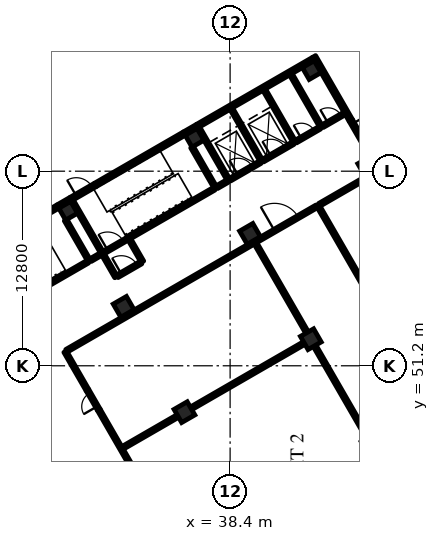
"""IFC4 building model, lengths in metres.
Left out: names, types, materials, properties, quantities, classifications, styles, units other than length and angle.
Written with IfcOpenShell. Run it as: python <this file> out.ifc"""

import sys

from ifc_helpers import new_model, si_unit, direction, frame, frame_2d, origin, origin_2d, place, context, subcontext, project, spatial, rectangle, extrude, element, fill, save


model = new_model("IFC4")
c1 = context("Model", 3, precision=1e-05, world=origin(), true_north=direction((0.0, 1.0)))
c2 = subcontext(c1, "Body", "Model", "MODEL_VIEW")
j1 = project(units=[si_unit("LENGTHUNIT", "METRE"), si_unit("PLANEANGLEUNIT", "RADIAN")], contexts=[c1])
p1 = place(None, origin())
s1 = spatial("IfcSite", under=j1, at=p1, CompositionType="ELEMENT")
p2 = place(p1, origin())
s2 = spatial("IfcBuilding", under=s1, at=p2, CompositionType="ELEMENT")
p3 = place(p2, origin())
s3 = spatial("IfcBuildingStorey", under=s2, at=p3, CompositionType="ELEMENT", Elevation=0.0)
for number, where, z_axis, x_axis in (
    (1, (35.396, 48.149, -0.3), (0.0, 0.0, 1.0), (-0.5, 0.866, 0.0)),
    (2, (43.71, 52.948, -0.3), (0.0, 0.0, 1.0), (-0.5, 0.866, 0.0)),
    (3, (31.396, 55.077, -0.3), (0.0, 0.0, 1.0), (-0.5, 0.866, 0.0)),
    (4, (39.71, 59.877, -0.3), (0.0, 0.0, 1.0), (-0.5, 0.866, 0.0)),
):
    element("IfcColumn", number, at=place(p3, frame(where, z_axis=z_axis, x_axis=x_axis)), inside=s3, PredefinedType="COLUMN", context=c2, shape_type="SweptSolid", body=[
        extrude(rectangle(XDim=1.0, YDim=1.0, at=origin_2d()), origin(), (0.0, 0.0, 1.0), 6.3),
    ])
for number, where, z_axis, x_axis in (
    (5, (47.417, 64.327, -0.3), (0.0, 0.0, 1.0), (-0.5, 0.866, 0.0)),
    (6, (27.746, 61.399, -0.3), (0.0, 0.0, 1.0), (-0.5, 0.866, 0.0)),
    (7, (36.06, 66.199, -0.3), (0.0, 0.0, 1.0), (-0.5, 0.866, 0.0)),
    (8, (43.767, 70.649, -0.3), (0.0, 0.0, 1.0), (-0.5, 0.866, 0.0)),
):
    element("IfcColumn", number, at=place(p3, frame(where, z_axis=z_axis, x_axis=x_axis)), inside=s3, PredefinedType="COLUMN", context=c2, shape_type="SweptSolid", body=[
        extrude(rectangle(XDim=0.9, YDim=0.9, at=origin_2d()), origin(), (0.0, 0.0, 1.0), 6.3),
    ])
p4 = place(p3, frame((38.194, 63.303, -1.5), z_axis=(0.0, 0.0, 1.0), x_axis=(0.866009148195, 0.50002815445, 0.0)))
e9 = element("IfcWall", 9, at=p4, inside=s3, PredefinedType="SOLIDWALL", context=c2, shape_type="SweptSolid", body=[
    extrude(rectangle(XDim=5.3, YDim=0.25, at=frame_2d((2.65, 0.0))), origin(), (0.0, 0.0, 1.0), 1.2),
])
p5 = place(p3, frame((36.719, 65.857, -1.5), z_axis=(0.0, 0.0, 1.0), x_axis=(0.866020664882, 0.50000820793, 0.0)))
e10 = element("IfcWall", 10, at=p5, inside=s3, PredefinedType="SOLIDWALL", context=c2, shape_type="SweptSolid", body=[
    extrude(rectangle(XDim=5.3, YDim=0.25, at=frame_2d((2.65, 0.0))), origin(), (0.0, 0.0, 1.0), 1.2),
])
p6 = place(p3, frame((38.239, 63.473, -1.5), z_axis=(0.0, 0.0, 1.0), x_axis=(-0.4999416173, 0.866059108428, 0.0)))
e11 = element("IfcWall", 11, at=p6, inside=s3, PredefinedType="SOLIDWALL", context=c2, shape_type="SweptSolid", body=[
    extrude(rectangle(XDim=2.7, YDim=0.25, at=frame_2d((1.35, 0.0))), origin(), (0.0, 0.0, 1.0), 1.2),
])
p7 = place(p3, frame((42.613, 65.999, -1.5), z_axis=(0.0, 0.0, 1.0), x_axis=(-0.50000943426, 0.866019956843, 0.0)))
e12 = element("IfcWall", 12, at=p7, inside=s3, PredefinedType="SOLIDWALL", context=c2, shape_type="SweptSolid", body=[
    extrude(rectangle(XDim=2.7, YDim=0.25, at=frame_2d((1.35, 0.0))), origin(), (0.0, 0.0, 1.0), 1.2),
])
p8 = place(p3, frame((46.34, 67.342, 0.0), z_axis=(0.0, 0.0, 1.0), x_axis=(0.499998129301, -0.86602648383, 0.0)))
e13 = element("IfcWall", 13, at=p8, inside=s3, PredefinedType="SOLIDWALL", context=c2, shape_type="SweptSolid", body=[
    extrude(rectangle(XDim=2.3, YDim=0.25, at=frame_2d((1.15, 0.0))), origin(), (0.0, 0.0, 1.0), 5.7),
])
p9 = place(p8, frame((0.25, 0.0, 0.0)))
e14 = element("IfcOpeningElement", 14, at=p9, cuts=e13, PredefinedType="OPENING", context=c2, shape_type="SweptSolid", body=[
    extrude(rectangle(XDim=1.8, YDim=2.1, at=frame_2d((0.9, 1.05))), frame((0.0, 0.135, 0.0), z_axis=(0.0, -1.0, 0.0), x_axis=(1.0, 0.0, 0.0)), (0.0, 0.0, 1.0), 0.27),
])
p10 = place(p3, frame((43.915, 71.542, 0.0), z_axis=(0.0, 0.0, 1.0), x_axis=(0.500010041276, -0.866019606374, 0.0)))
e15 = element("IfcWall", 15, at=p10, inside=s3, PredefinedType="SOLIDWALL", context=c2, shape_type="SweptSolid", body=[
    extrude(rectangle(XDim=4.85, YDim=0.25, at=frame_2d((2.425, 0.0))), origin(), (0.0, 0.0, 1.0), 5.7),
])
p11 = place(p3, frame((21.223, 58.297, 0.0), z_axis=(0.0, 0.0, 1.0), x_axis=(0.866026575979, 0.499997969693, 0.0)))
e16 = element("IfcWall", 16, at=p11, inside=s3, PredefinedType="SOLIDWALL", context=c2, shape_type="SweptSolid", body=[
    extrude(rectangle(XDim=6.75, YDim=0.25, at=frame_2d((3.375, 0.0))), origin(), (0.0, 0.0, 1.0), 5.7),
])
p12 = place(p3, frame((27.935, 62.172, 0.0), z_axis=(0.0, 0.0, 1.0), x_axis=(0.866091100096, 0.499886193382, 0.0)))
e17 = element("IfcWall", 17, at=p12, inside=s3, PredefinedType="SOLIDWALL", context=c2, shape_type="SweptSolid", body=[
    extrude(rectangle(XDim=1.85, YDim=0.25, at=frame_2d((0.925, 0.0))), origin(), (0.0, 0.0, 1.0), 5.7),
])
p13 = place(p12, frame((0.4, 0.0, 0.0)))
e18 = element("IfcOpeningElement", 18, at=p13, cuts=e17, PredefinedType="OPENING", context=c2, shape_type="SweptSolid", body=[
    extrude(rectangle(XDim=1.2, YDim=2.1, at=frame_2d((0.6, 1.05))), frame((0.0, 0.135, 0.0), z_axis=(0.0, -1.0, 0.0), x_axis=(1.0, 0.0, 0.0)), (0.0, 0.0, 1.0), 0.27),
])
p14 = place(p3, frame((29.537, 63.097, 0.0), z_axis=(0.0, 0.0, 1.0), x_axis=(0.866026575979, 0.499997969693, 0.0)))
e19 = element("IfcWall", 19, at=p14, inside=s3, PredefinedType="SOLIDWALL", context=c2, shape_type="SweptSolid", body=[
    extrude(rectangle(XDim=6.75, YDim=0.25, at=frame_2d((3.375, 0.0))), origin(), (0.0, 0.0, 1.0), 5.7),
])
p15 = place(p3, frame((36.249, 66.972, 0.0), z_axis=(0.0, 0.0, 1.0), x_axis=(0.866013253925, 0.500021043584, 0.0)))
e20 = element("IfcWall", 20, at=p15, inside=s3, PredefinedType="SOLIDWALL", context=c2, shape_type="SweptSolid", body=[
    extrude(rectangle(XDim=8.8, YDim=0.25, at=frame_2d((4.4, 0.0))), origin(), (0.0, 0.0, 1.0), 5.7),
])
for number, where, z_axis, x_axis in (
    (21, (27.069, 61.672, 0.0), (0.0, 0.0, 1.0), (0.866, 0.5, 0.0)),
    (22, (35.383, 66.472, 0.0), (0.0, 0.0, 1.0), (0.866, 0.5, 0.0)),
):
    element("IfcWall", number, at=place(p3, frame(where, z_axis=z_axis, x_axis=x_axis)), inside=s3, PredefinedType="SOLIDWALL", context=c2, shape_type="SweptSolid", body=[
        extrude(rectangle(XDim=1.0, YDim=0.25, at=frame_2d((0.5, 0.0))), origin(), (0.0, 0.0, 1.0), 5.7),
    ])
p16 = place(p3, frame((29.131, 58.099, 0.0), z_axis=(0.0, 0.0, 1.0), x_axis=(-0.49999285859, 0.86602952684, 0.0)))
e23 = element("IfcWall", 23, at=p16, inside=s3, PredefinedType="SOLIDWALL", context=c2, shape_type="SweptSolid", body=[
    extrude(rectangle(XDim=3.1, YDim=0.2, at=frame_2d((1.55, 0.0))), origin(), (0.0, 0.0, 1.0), 5.7),
])
p17 = place(p3, frame((29.997, 58.599, 0.0), z_axis=(0.0, 0.0, 1.0), x_axis=(-0.49999894854, 0.866026010844, 0.0)))
e24 = element("IfcWall", 24, at=p17, inside=s3, PredefinedType="SOLIDWALL", context=c2, shape_type="SweptSolid", body=[
    extrude(rectangle(XDim=4.0, YDim=0.2, at=frame_2d((2.0, 0.0))), origin(), (0.0, 0.0, 1.0), 5.7),
])
p18 = place(p3, frame((37.445, 62.899, 0.0), z_axis=(0.0, 0.0, 1.0), x_axis=(-0.500026960575, 0.86600983753, 0.0)))
e25 = element("IfcWall", 25, at=p18, inside=s3, PredefinedType="SOLIDWALL", context=c2, shape_type="SweptSolid", body=[
    extrude(rectangle(XDim=3.1, YDim=0.2, at=frame_2d((1.55, 0.0))), origin(), (0.0, 0.0, 1.0), 5.7),
])
p19 = place(p3, frame((23.285, 54.724, 0.0), z_axis=(0.0, 0.0, 1.0), x_axis=(0.866027239912, 0.49999681972, 0.0)))
e26 = element("IfcWall", 26, at=p19, inside=s3, PredefinedType="SOLIDWALL", context=c2, shape_type="SweptSolid", body=[
    extrude(rectangle(XDim=6.65, YDim=0.2, at=frame_2d((3.325, 0.0))), origin(), (0.0, 0.0, 1.0), 5.7),
])
p20 = place(p3, frame((30.084, 58.649, 0.0), z_axis=(0.0, 0.0, 1.0), x_axis=(0.866036909293, 0.499980071345, 0.0)))
e27 = element("IfcWall", 27, at=p20, inside=s3, PredefinedType="SOLIDWALL", context=c2, shape_type="SweptSolid", body=[
    extrude(rectangle(XDim=1.75, YDim=0.2, at=frame_2d((0.875, 0.0))), origin(), (0.0, 0.0, 1.0), 5.7),
])
p21 = place(p20, frame((0.3, 0.0, 0.0)))
e28 = element("IfcOpeningElement", 28, at=p21, cuts=e27, PredefinedType="OPENING", context=c2, shape_type="SweptSolid", body=[
    extrude(rectangle(XDim=1.2, YDim=2.1, at=frame_2d((0.6, 1.05))), frame((0.0, 0.11, 0.0), z_axis=(0.0, -1.0, 0.0), x_axis=(1.0, 0.0, 0.0)), (0.0, 0.0, 1.0), 0.22),
])
p22 = place(p3, frame((31.599, 59.524, 0.0), z_axis=(0.0, 0.0, 1.0), x_axis=(0.866027239912, 0.49999681972, 0.0)))
e29 = element("IfcWall", 29, at=p22, inside=s3, PredefinedType="SOLIDWALL", context=c2, shape_type="SweptSolid", body=[
    extrude(rectangle(XDim=6.65, YDim=0.2, at=frame_2d((3.325, 0.0))), origin(), (0.0, 0.0, 1.0), 5.7),
])
for number, where, z_axis, x_axis in (
    (30, (38.311, 63.399, 0.0), (0.0, 0.0, 1.0), (-0.5, 0.866, 0.0)),
    (31, (40.476, 64.649, 0.0), (0.0, 0.0, 1.0), (-0.5, 0.866, 0.0)),
    (32, (42.641, 65.899, 0.0), (0.0, 0.0, 1.0), (-0.5, 0.866, 0.0)),
):
    element("IfcWall", number, at=place(p3, frame(where, z_axis=z_axis, x_axis=x_axis)), inside=s3, PredefinedType="SOLIDWALL", context=c2, shape_type="SweptSolid", body=[
        extrude(rectangle(XDim=4.0, YDim=0.2, at=frame_2d((2.0, 0.0))), origin(), (0.0, 0.0, 1.0), 5.7),
    ])
p23 = place(p3, frame((38.398, 63.449, 0.0), z_axis=(0.0, 0.0, 1.0), x_axis=(0.86602648383, 0.499998129301, 0.0)))
e33 = element("IfcWall", 33, at=p23, inside=s3, PredefinedType="SOLIDWALL", context=c2, shape_type="SweptSolid", body=[
    extrude(rectangle(XDim=2.3, YDim=0.2, at=frame_2d((1.15, 0.0))), origin(), (0.0, 0.0, 1.0), 5.7),
])
p24 = place(p23, frame((0.6, 0.0, 0.0)))
e34 = element("IfcOpeningElement", 34, at=p24, cuts=e33, PredefinedType="OPENING", context=c2, shape_type="SweptSolid", body=[
    extrude(rectangle(XDim=1.1, YDim=2.1, at=frame_2d((0.55, 1.05))), frame((0.0, 0.11, 0.0), z_axis=(0.0, -1.0, 0.0), x_axis=(1.0, 0.0, 0.0)), (0.0, 0.0, 1.0), 0.22),
])
p25 = place(p3, frame((40.563, 64.699, 0.0), z_axis=(0.0, 0.0, 1.0), x_axis=(0.86602648383, 0.499998129301, 0.0)))
e35 = element("IfcWall", 35, at=p25, inside=s3, PredefinedType="SOLIDWALL", context=c2, shape_type="SweptSolid", body=[
    extrude(rectangle(XDim=2.3, YDim=0.2, at=frame_2d((1.15, 0.0))), origin(), (0.0, 0.0, 1.0), 5.7),
])
p26 = place(p25, frame((0.6, 0.0, 0.0)))
e36 = element("IfcOpeningElement", 36, at=p26, cuts=e35, PredefinedType="OPENING", context=c2, shape_type="SweptSolid", body=[
    extrude(rectangle(XDim=1.1, YDim=2.1, at=frame_2d((0.55, 1.05))), frame((0.0, 0.11, 0.0), z_axis=(0.0, -1.0, 0.0), x_axis=(1.0, 0.0, 0.0)), (0.0, 0.0, 1.0), 0.22),
])
for number, where, z_axis, x_axis in (
    (37, (30.897, 57.041, 0.0), (0.0, 0.0, 1.0), (-0.5, 0.866, 0.0)),
    (38, (32.629, 58.041, 0.0), (0.0, 0.0, 1.0), (-0.5, 0.866, 0.0)),
):
    element("IfcWall", number, at=place(p3, frame(where, z_axis=z_axis, x_axis=x_axis)), inside=s3, PredefinedType="PARTITIONING", context=c2, shape_type="SweptSolid", body=[
        extrude(rectangle(XDim=1.7, YDim=0.2, at=frame_2d((0.85, 0.0))), origin(), (0.0, 0.0, 1.0), 5.1),
    ])
p27 = place(p3, frame((30.984, 57.091, 0.0), z_axis=(0.0, 0.0, 1.0), x_axis=(0.866047807691, 0.499961193289, 0.0)))
e39 = element("IfcWall", 39, at=p27, inside=s3, PredefinedType="PARTITIONING", context=c2, shape_type="SweptSolid", body=[
    extrude(rectangle(XDim=1.8, YDim=0.2, at=frame_2d((0.9, 0.0))), origin(), (0.0, 0.0, 1.0), 5.1),
])
p28 = place(p27, frame((0.3, 0.0, 0.0)))
e40 = element("IfcOpeningElement", 40, at=p28, cuts=e39, PredefinedType="OPENING", context=c2, shape_type="SweptSolid", body=[
    extrude(rectangle(XDim=1.2, YDim=2.1, at=frame_2d((0.6, 1.05))), frame((0.0, 0.11, 0.0), z_axis=(0.0, -1.0, 0.0), x_axis=(1.0, 0.0, 0.0)), (0.0, 0.0, 1.0), 0.22),
])
p29 = place(p3, frame((44.395, 66.912, 0.0), z_axis=(0.0, 0.0, 1.0), x_axis=(-0.49999894854, 0.866026010844, 0.0)))
e41 = element("IfcWall", 41, at=p29, inside=s3, PredefinedType="PARTITIONING", context=c2, shape_type="SweptSolid", body=[
    extrude(rectangle(XDim=4.0, YDim=0.2, at=frame_2d((2.0, 0.0))), origin(), (0.0, 0.0, 1.0), 5.1),
])
p30 = place(p3, frame((42.728, 65.949, 0.0), z_axis=(0.0, 0.0, 1.0), x_axis=(0.866036312054, 0.499981105847, 0.0)))
e42 = element("IfcWall", 42, at=p30, inside=s3, PredefinedType="PARTITIONING", context=c2, shape_type="SweptSolid", body=[
    extrude(rectangle(XDim=1.825, YDim=0.2, at=frame_2d((0.912, 0.0))), origin(), (0.0, 0.0, 1.0), 5.1),
])
p31 = place(p30, frame((0.413, 0.0, 0.0)))
e43 = element("IfcOpeningElement", 43, at=p31, cuts=e42, PredefinedType="OPENING", context=c2, shape_type="SweptSolid", body=[
    extrude(rectangle(XDim=1.0, YDim=2.1, at=frame_2d((0.5, 1.05))), frame((0.0, 0.11, 0.0), z_axis=(0.0, -1.0, 0.0), x_axis=(1.0, 0.0, 0.0)), (0.0, 0.0, 1.0), 0.22),
])
p32 = place(p3, frame((44.481, 66.962, 0.0), z_axis=(0.0, 0.0, 1.0), x_axis=(0.866027799164, 0.499995851058, 0.0)))
e44 = element("IfcWall", 44, at=p32, inside=s3, PredefinedType="PARTITIONING", context=c2, shape_type="SweptSolid", body=[
    extrude(rectangle(XDim=1.675, YDim=0.2, at=frame_2d((0.837, 0.0))), origin(), (0.0, 0.0, 1.0), 5.1),
])
p33 = place(p32, frame((0.413, 0.0, 0.0)))
e45 = element("IfcOpeningElement", 45, at=p33, cuts=e44, PredefinedType="OPENING", context=c2, shape_type="SweptSolid", body=[
    extrude(rectangle(XDim=1.0, YDim=2.1, at=frame_2d((0.5, 1.05))), frame((0.0, 0.11, 0.0), z_axis=(0.0, -1.0, 0.0), x_axis=(1.0, 0.0, 0.0)), (0.0, 0.0, 1.0), 0.22),
])
p34 = place(p3, frame((26.832, 43.781, 0.0), z_axis=(0.0, 0.0, 1.0), x_axis=(-0.499988857673, 0.866031836714, 0.0)))
e46 = element("IfcWall", 46, at=p34, inside=s3, PredefinedType="PARTITIONING", context=c2, shape_type="SweptSolid", body=[
    extrude(rectangle(XDim=6.875, YDim=0.2, at=frame_2d((3.438, 0.0))), origin(), (0.0, 0.0, 1.0), 5.1),
])
p35 = place(p3, frame((34.664, 39.816, 0.0), z_axis=(0.0, 0.0, 1.0), x_axis=(-0.49999201416, 0.866030014362, 0.0)))
e47 = element("IfcWall", 47, at=p35, inside=s3, PredefinedType="PARTITIONING", context=c2, shape_type="SweptSolid", body=[
    extrude(rectangle(XDim=9.8, YDim=0.2, at=frame_2d((4.9, 0.0))), origin(), (0.0, 0.0, 1.0), 5.1),
])
p36 = place(p3, frame((29.764, 48.303, 0.0), z_axis=(0.0, 0.0, 1.0), x_axis=(-0.500060622324, 0.86599040064, 0.0)))
e48 = element("IfcWall", 48, at=p36, inside=s3, PredefinedType="PARTITIONING", context=c2, shape_type="SweptSolid", body=[
    extrude(rectangle(XDim=1.5, YDim=0.2, at=frame_2d((0.75, 0.0))), origin(), (0.0, 0.0, 1.0), 5.1),
])
p37 = place(p36, frame((0.25, 0.0, 0.0)))
e49 = element("IfcOpeningElement", 49, at=p37, cuts=e48, PredefinedType="OPENING", context=c2, shape_type="SweptSolid", body=[
    extrude(rectangle(XDim=1.0, YDim=2.1, at=frame_2d((0.5, 1.05))), frame((0.0, 0.11, 0.0), z_axis=(0.0, -1.0, 0.0), x_axis=(1.0, 0.0, 0.0)), (0.0, 0.0, 1.0), 0.22),
])
p38 = place(p3, frame((29.014, 49.602, 0.0), z_axis=(0.0, 0.0, 1.0), x_axis=(-0.499963291492, 0.866046596414, 0.0)))
e50 = element("IfcWall", 50, at=p38, inside=s3, PredefinedType="PARTITIONING", context=c2, shape_type="SweptSolid", body=[
    extrude(rectangle(XDim=2.925, YDim=0.2, at=frame_2d((1.462, 0.0))), origin(), (0.0, 0.0, 1.0), 5.1),
])
p39 = place(p3, frame((47.46, 46.453, 0.0), z_axis=(0.0, 0.0, 1.0), x_axis=(-0.499995173006, 0.866028190633, 0.0)))
e51 = element("IfcWall", 51, at=p39, inside=s3, PredefinedType="PARTITIONING", context=c2, shape_type="SweptSolid", body=[
    extrude(rectangle(XDim=7.0, YDim=0.2, at=frame_2d((3.5, 0.0))), origin(), (0.0, 0.0, 1.0), 5.1),
])
p40 = place(p3, frame((43.46, 53.382, 0.0), z_axis=(0.0, 0.0, 1.0), x_axis=(-0.499988857673, 0.866031836714, 0.0)))
e52 = element("IfcWall", 52, at=p40, inside=s3, PredefinedType="PARTITIONING", context=c2, shape_type="SweptSolid", body=[
    extrude(rectangle(XDim=6.875, YDim=0.2, at=frame_2d((3.438, 0.0))), origin(), (0.0, 0.0, 1.0), 5.1),
])
p41 = place(p3, frame((47.442, 56.085, 0.0), z_axis=(0.0, 0.0, 1.0), x_axis=(-0.499990197047, 0.866031063448, 0.0)))
e53 = element("IfcWall", 53, at=p41, inside=s3, PredefinedType="PARTITIONING", context=c2, shape_type="SweptSolid", body=[
    extrude(rectangle(XDim=6.525, YDim=0.2, at=frame_2d((3.263, 0.0))), origin(), (0.0, 0.0, 1.0), 5.1),
])
p42 = place(p3, frame((31.325, 45.799, 0.0), z_axis=(0.0, 0.0, 1.0), x_axis=(0.866023935413, 0.500002543286, 0.0)))
e54 = element("IfcWall", 54, at=p42, inside=s3, PredefinedType="PARTITIONING", context=c2, shape_type="SweptSolid", body=[
    extrude(rectangle(XDim=4.2, YDim=0.2, at=frame_2d((2.1, 0.0))), origin(), (0.0, 0.0, 1.0), 5.1),
])
p43 = place(p3, frame((35.829, 48.399, 0.0), z_axis=(0.0, 0.0, 1.0), x_axis=(0.866033360935, 0.499986217557, 0.0)))
e55 = element("IfcWall", 55, at=p43, inside=s3, PredefinedType="PARTITIONING", context=c2, shape_type="SweptSolid", body=[
    extrude(rectangle(XDim=8.6, YDim=0.2, at=frame_2d((4.3, 0.0))), origin(), (0.0, 0.0, 1.0), 5.1),
])
p44 = place(p3, frame((27.638, 52.186, 0.0), z_axis=(0.0, 0.0, 1.0), x_axis=(0.866023247849, 0.500003734171, 0.0)))
e56 = element("IfcWall", 56, at=p44, inside=s3, PredefinedType="PARTITIONING", context=c2, shape_type="SweptSolid", body=[
    extrude(rectangle(XDim=14.2, YDim=0.2, at=frame_2d((7.1, 0.0))), origin(), (0.0, 0.0, 1.0), 5.1),
])
p45 = place(p3, frame((44.266, 61.786, 0.0), z_axis=(0.0, 0.0, 1.0), x_axis=(0.866036664382, 0.499980495566, 0.0)))
e57 = element("IfcWall", 57, at=p45, inside=s3, PredefinedType="PARTITIONING", context=c2, shape_type="SweptSolid", body=[
    extrude(rectangle(XDim=4.45, YDim=0.2, at=frame_2d((2.225, 0.0))), origin(), (0.0, 0.0, 1.0), 5.1),
])
p46 = place(p3, frame((40.109, 59.385, 0.0), z_axis=(0.0, 0.0, 1.0), x_axis=(0.866016770315, 0.500014953309, 0.0)))
e58 = element("IfcWall", 58, at=p46, inside=s3, PredefinedType="PARTITIONING", context=c2, shape_type="SweptSolid", body=[
    extrude(rectangle(XDim=4.6, YDim=0.2, at=frame_2d((2.3, 0.0))), origin(), (0.0, 0.0, 1.0), 5.1),
])
p47 = place(p46, frame((1.4, 0.0, 0.0)))
e59 = element("IfcOpeningElement", 59, at=p47, cuts=e58, PredefinedType="OPENING", context=c2, shape_type="SweptSolid", body=[
    extrude(rectangle(XDim=1.8, YDim=2.1, at=frame_2d((0.9, 1.05))), frame((0.0, 0.11, 0.0), z_axis=(0.0, -1.0, 0.0), x_axis=(1.0, 0.0, 0.0)), (0.0, 0.0, 1.0), 0.22),
])
p48 = place(p3, frame((29.218, 58.149, 0.0), z_axis=(0.0, 0.0, 1.0), x_axis=(0.866017831539, 0.500013115284, 0.0)))
e60 = element("IfcWall", 60, at=p48, inside=s3, PredefinedType="PARTITIONING", context=c2, shape_type="SweptSolid", body=[
    extrude(rectangle(XDim=0.8, YDim=0.2, at=frame_2d((0.4, 0.0))), origin(), (0.0, 0.0, 1.0), 5.1),
])
p49 = place(p3, frame((37.531, 62.949, 0.0), z_axis=(0.0, 0.0, 1.0), x_axis=(0.866094119867, 0.499880961361, 0.0)))
e61 = element("IfcWall", 61, at=p49, inside=s3, PredefinedType="PARTITIONING", context=c2, shape_type="SweptSolid", body=[
    extrude(rectangle(XDim=0.8, YDim=0.2, at=frame_2d((0.4, 0.0))), origin(), (0.0, 0.0, 1.0), 5.1),
])
p50 = place(p9, origin())
e62 = element("IfcDoor", 62, at=p50, inside=s3, OperationType="DOUBLE_DOOR_SINGLE_SWING", PredefinedType="DOOR", context=c2, shape_type="SweptSolid", body=[
    extrude(rectangle(XDim=1.8, YDim=2.1, at=frame_2d((0.9, 1.05))), frame((0.0, 0.025, 0.0), z_axis=(0.0, -1.0, 0.0), x_axis=(1.0, 0.0, 0.0)), (0.0, 0.0, 1.0), 0.05),
])
fill(e14, e62)
p51 = place(p13, origin())
e63 = element("IfcDoor", 63, at=p51, inside=s3, OperationType="SINGLE_SWING_LEFT", PredefinedType="DOOR", context=c2, shape_type="SweptSolid", body=[
    extrude(rectangle(XDim=1.2, YDim=2.1, at=frame_2d((0.6, 1.05))), frame((0.0, 0.025, 0.0), z_axis=(0.0, -1.0, 0.0), x_axis=(1.0, 0.0, 0.0)), (0.0, 0.0, 1.0), 0.05),
])
fill(e18, e63)
p52 = place(p21, origin())
e64 = element("IfcDoor", 64, at=p52, inside=s3, OperationType="SINGLE_SWING_LEFT", PredefinedType="DOOR", context=c2, shape_type="SweptSolid", body=[
    extrude(rectangle(XDim=1.2, YDim=2.1, at=frame_2d((0.6, 1.05))), frame((0.0, 0.025, 0.0), z_axis=(0.0, -1.0, 0.0), x_axis=(1.0, 0.0, 0.0)), (0.0, 0.0, 1.0), 0.05),
])
fill(e28, e64)
p53 = place(p24, origin())
e65 = element("IfcDoor", 65, at=p53, inside=s3, OperationType="DOUBLE_DOOR_SLIDING", PredefinedType="DOOR", context=c2, shape_type="SweptSolid", body=[
    extrude(rectangle(XDim=1.1, YDim=2.1, at=frame_2d((0.55, 1.05))), frame((0.0, 0.025, 0.0), z_axis=(0.0, -1.0, 0.0), x_axis=(1.0, 0.0, 0.0)), (0.0, 0.0, 1.0), 0.05),
])
fill(e34, e65)
p54 = place(p26, origin())
e66 = element("IfcDoor", 66, at=p54, inside=s3, OperationType="DOUBLE_DOOR_SLIDING", PredefinedType="DOOR", context=c2, shape_type="SweptSolid", body=[
    extrude(rectangle(XDim=1.1, YDim=2.1, at=frame_2d((0.55, 1.05))), frame((0.0, 0.025, 0.0), z_axis=(0.0, -1.0, 0.0), x_axis=(1.0, 0.0, 0.0)), (0.0, 0.0, 1.0), 0.05),
])
fill(e36, e66)
p55 = place(p28, origin())
e67 = element("IfcDoor", 67, at=p55, inside=s3, OperationType="SINGLE_SWING_LEFT", PredefinedType="DOOR", context=c2, shape_type="SweptSolid", body=[
    extrude(rectangle(XDim=1.2, YDim=2.1, at=frame_2d((0.6, 1.05))), frame((0.0, 0.025, 0.0), z_axis=(0.0, -1.0, 0.0), x_axis=(1.0, 0.0, 0.0)), (0.0, 0.0, 1.0), 0.05),
])
fill(e40, e67)
p56 = place(p31, origin())
e68 = element("IfcDoor", 68, at=p56, inside=s3, OperationType="SINGLE_SWING_LEFT", PredefinedType="DOOR", context=c2, shape_type="SweptSolid", body=[
    extrude(rectangle(XDim=1.0, YDim=2.1, at=frame_2d((0.5, 1.05))), frame((0.0, 0.025, 0.0), z_axis=(0.0, -1.0, 0.0), x_axis=(1.0, 0.0, 0.0)), (0.0, 0.0, 1.0), 0.05),
])
fill(e43, e68)
p57 = place(p33, origin())
e69 = element("IfcDoor", 69, at=p57, inside=s3, OperationType="SINGLE_SWING_LEFT", PredefinedType="DOOR", context=c2, shape_type="SweptSolid", body=[
    extrude(rectangle(XDim=1.0, YDim=2.1, at=frame_2d((0.5, 1.05))), frame((0.0, 0.025, 0.0), z_axis=(0.0, -1.0, 0.0), x_axis=(1.0, 0.0, 0.0)), (0.0, 0.0, 1.0), 0.05),
])
fill(e45, e69)
p58 = place(p37, origin())
e70 = element("IfcDoor", 70, at=p58, inside=s3, OperationType="SINGLE_SWING_LEFT", PredefinedType="DOOR", context=c2, shape_type="SweptSolid", body=[
    extrude(rectangle(XDim=1.0, YDim=2.1, at=frame_2d((0.5, 1.05))), frame((0.0, 0.025, 0.0), z_axis=(0.0, -1.0, 0.0), x_axis=(1.0, 0.0, 0.0)), (0.0, 0.0, 1.0), 0.05),
])
fill(e49, e70)
p59 = place(p47, origin())
e71 = element("IfcDoor", 71, at=p59, inside=s3, OperationType="DOUBLE_DOOR_SINGLE_SWING", PredefinedType="DOOR", context=c2, shape_type="SweptSolid", body=[
    extrude(rectangle(XDim=1.8, YDim=2.1, at=frame_2d((0.9, 1.05))), frame((0.0, 0.025, 0.0), z_axis=(0.0, -1.0, 0.0), x_axis=(1.0, 0.0, 0.0)), (0.0, 0.0, 1.0), 0.05),
])
fill(e59, e71)
save(model, sys.argv[1])
